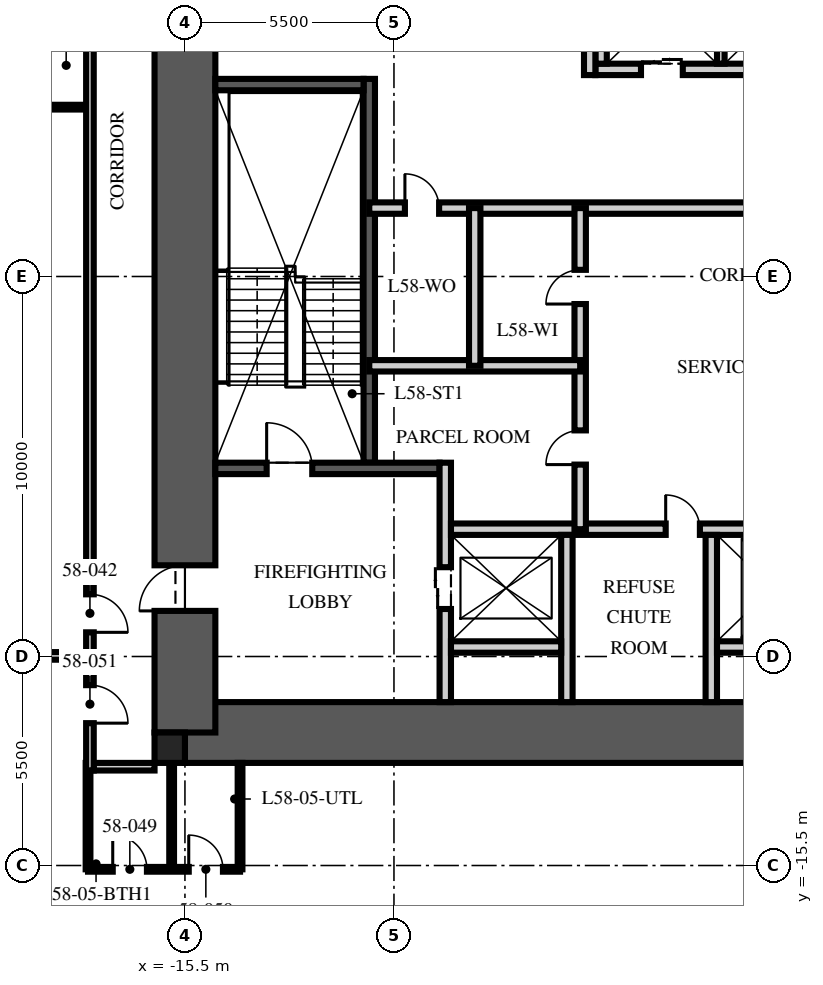
"""IFC4 building model, lengths in metres.
Left out: names, types, materials, properties, quantities, classifications, styles, units other than length and angle.
Written with IfcOpenShell. Run it as: python <this file> out.ifc"""

import sys

from ifc_helpers import new_model, si_unit, direction, frame, frame_2d, origin, origin_2d, place, context, subcontext, project, spatial, rectangle, extrude, element, fill, save


model = new_model("IFC4")
c1 = context("Model", 3, precision=1e-05, world=origin(), true_north=direction((0.0, 1.0)))
c2 = subcontext(c1, "Body", "Model", "MODEL_VIEW")
j1 = project(units=[si_unit("LENGTHUNIT", "METRE"), si_unit("PLANEANGLEUNIT", "RADIAN")], contexts=[c1])
p1 = place(None, origin())
s1 = spatial("IfcSite", under=j1, at=p1, CompositionType="ELEMENT")
p2 = place(p1, origin())
s2 = spatial("IfcBuilding", under=s1, at=p2, CompositionType="ELEMENT")
p3 = place(p2, frame((0.0, 0.0, 233.25)))
s3 = spatial("IfcBuildingStorey", under=s2, at=p3, CompositionType="ELEMENT", Elevation=233.25)
p4 = place(p3, frame((-15.5, -12.0, -0.25), z_axis=(0.0, 0.0, 1.0), x_axis=(1.0, 0.0, 0.0)))
e1 = element("IfcWall", 1, at=p4, inside=s3, PredefinedType="SHEAR", context=c2, shape_type="SweptSolid", body=[
    extrude(rectangle(XDim=31.0, YDim=1.6, at=frame_2d((15.5, 0.0))), origin(), (0.0, 0.0, 1.0), 3.75),
])
p5 = place(p3, frame((-15.5, -12.0, -0.25), z_axis=(0.0, 0.0, 1.0), x_axis=(0.0, 1.0, 0.0)))
e2 = element("IfcWall", 2, at=p5, inside=s3, PredefinedType="SHEAR", context=c2, shape_type="SweptSolid", body=[
    extrude(rectangle(XDim=24.0, YDim=1.6, at=frame_2d((12.0, 0.0))), origin(), (0.0, 0.0, 1.0), 3.75),
])
p6 = place(p5, frame((3.2, 0.0, 0.25)))
e3 = element("IfcOpeningElement", 3, at=p6, cuts=e2, PredefinedType="OPENING", context=c2, shape_type="SweptSolid", body=[
    extrude(rectangle(XDim=1.2, YDim=2.1, at=frame_2d((0.6, 1.05))), frame((0.0, 0.81, 0.0), z_axis=(0.0, -1.0, 0.0), x_axis=(1.0, 0.0, 0.0)), (0.0, 0.0, 1.0), 1.62),
])
p7 = place(p5, frame((19.3, 0.0, 0.25)))
e4 = element("IfcOpeningElement", 4, at=p7, cuts=e2, PredefinedType="OPENING", context=c2, shape_type="SweptSolid", body=[
    extrude(rectangle(XDim=1.8, YDim=2.1, at=frame_2d((0.9, 1.05))), frame((0.0, 0.81, 0.0), z_axis=(0.0, -1.0, 0.0), x_axis=(1.0, 0.0, 0.0)), (0.0, 0.0, 1.0), 1.62),
])
p8 = place(p3, frame((-15.9, -12.4, -0.25), z_axis=(0.0, 0.0, 1.0), x_axis=(1.0, 0.0, 0.0)))
e5 = element("IfcColumn", 5, at=p8, inside=s3, PredefinedType="COLUMN", context=c2, shape_type="SweptSolid", body=[
    extrude(rectangle(XDim=0.8, YDim=0.8, at=origin_2d()), origin(), (0.0, 0.0, 1.0), 3.75),
])
p9 = place(p3, frame((-10.65, -4.9, 0.0), z_axis=(0.0, 0.0, 1.0), x_axis=(0.0, 1.0, 0.0)))
e6 = element("IfcWall", 6, at=p9, inside=s3, PredefinedType="SOLIDWALL", context=c2, shape_type="SweptSolid", body=[
    extrude(rectangle(XDim=10.1, YDim=0.3, at=frame_2d((5.05, 0.0))), origin(), (0.0, 0.0, 1.0), 3.5),
])
p10 = place(p3, frame((-14.7, -5.05, 0.0), z_axis=(0.0, 0.0, 1.0), x_axis=(1.0, 0.0, 0.0)))
e7 = element("IfcWall", 7, at=p10, inside=s3, PredefinedType="SOLIDWALL", context=c2, shape_type="SweptSolid", body=[
    extrude(rectangle(XDim=5.9, YDim=0.3, at=frame_2d((2.95, 0.0))), origin(), (0.0, 0.0, 1.0), 3.5),
])
p11 = place(p10, frame((1.35, 0.0, 0.0)))
e8 = element("IfcOpeningElement", 8, at=p11, cuts=e7, PredefinedType="OPENING", context=c2, shape_type="SweptSolid", body=[
    extrude(rectangle(XDim=1.2, YDim=2.1, at=frame_2d((0.6, 1.05))), frame((0.0, 0.16, 0.0), z_axis=(0.0, -1.0, 0.0), x_axis=(1.0, 0.0, 0.0)), (0.0, 0.0, 1.0), 0.32),
])
p12 = place(p3, frame((-14.7, 5.05, 0.0), z_axis=(0.0, 0.0, 1.0), x_axis=(1.0, 0.0, 0.0)))
e9 = element("IfcWall", 9, at=p12, inside=s3, PredefinedType="SOLIDWALL", context=c2, shape_type="SweptSolid", body=[
    extrude(rectangle(XDim=3.9, YDim=0.3, at=frame_2d((1.95, 0.0))), origin(), (0.0, 0.0, 1.0), 3.5),
])
p13 = place(p3, frame((-8.65, -11.2, 0.0), z_axis=(0.0, 0.0, 1.0), x_axis=(0.0, 1.0, 0.0)))
e10 = element("IfcWall", 10, at=p13, inside=s3, PredefinedType="PARTITIONING", context=c2, shape_type="SweptSolid", body=[
    extrude(rectangle(XDim=6.3, YDim=0.3, at=frame_2d((3.15, 0.0))), origin(), (0.0, 0.0, 1.0), 3.5),
])
p14 = place(p13, frame((2.45, 0.0, 0.0)))
e11 = element("IfcOpeningElement", 11, at=p14, cuts=e10, PredefinedType="OPENING", context=c2, shape_type="SweptSolid", body=[
    extrude(rectangle(XDim=1.1, YDim=2.1, at=frame_2d((0.55, 1.05))), frame((0.0, 0.16, 0.0), z_axis=(0.0, -1.0, 0.0), x_axis=(1.0, 0.0, 0.0)), (0.0, 0.0, 1.0), 0.32),
])
p15 = place(p3, frame((-8.5, -6.65, 0.0), z_axis=(0.0, 0.0, 1.0), x_axis=(1.0, 0.0, 0.0)))
e12 = element("IfcWall", 12, at=p15, inside=s3, PredefinedType="PARTITIONING", context=c2, shape_type="SweptSolid", body=[
    extrude(rectangle(XDim=17.0, YDim=0.3, at=frame_2d((8.5, 0.0))), origin(), (0.0, 0.0, 1.0), 3.5),
])
p16 = place(p15, frame((7.8, 0.0, 0.0)))
e13 = element("IfcOpeningElement", 13, at=p16, cuts=e12, PredefinedType="OPENING", context=c2, shape_type="SweptSolid", body=[
    extrude(rectangle(XDim=1.3, YDim=2.4, at=frame_2d((0.65, 1.2))), frame((0.0, 0.16, 0.0), z_axis=(0.0, -1.0, 0.0), x_axis=(1.0, 0.0, 0.0)), (0.0, 0.0, 1.0), 0.32),
])
p17 = place(p15, frame((5.65, 0.0, 0.0)))
e14 = element("IfcOpeningElement", 14, at=p17, cuts=e12, PredefinedType="OPENING", context=c2, shape_type="SweptSolid", body=[
    extrude(rectangle(XDim=0.9, YDim=2.1, at=frame_2d((0.45, 1.05))), frame((0.0, 0.16, 0.0), z_axis=(0.0, -1.0, 0.0), x_axis=(1.0, 0.0, 0.0)), (0.0, 0.0, 1.0), 0.32),
])
p18 = place(p15, frame((10.4, 0.0, 0.0)))
e15 = element("IfcOpeningElement", 15, at=p18, cuts=e12, PredefinedType="OPENING", context=c2, shape_type="SweptSolid", body=[
    extrude(rectangle(XDim=0.9, YDim=2.1, at=frame_2d((0.45, 1.05))), frame((0.0, 0.16, 0.0), z_axis=(0.0, -1.0, 0.0), x_axis=(1.0, 0.0, 0.0)), (0.0, 0.0, 1.0), 0.32),
])
for number, where, z_axis, x_axis in (
    (16, (-5.45, -11.2, 0.0), (0.0, 0.0, 1.0), (0.0, 1.0, 0.0)),
    (17, (-1.65, -11.2, 0.0), (0.0, 0.0, 1.0), (0.0, 1.0, 0.0)),
):
    element("IfcWall", number, at=place(p3, frame(where, z_axis=z_axis, x_axis=x_axis)), inside=s3, PredefinedType="PARTITIONING", context=c2, shape_type="SweptSolid", body=[
        extrude(rectangle(XDim=4.4, YDim=0.3, at=frame_2d((2.2, 0.0))), origin(), (0.0, 0.0, 1.0), 3.5),
    ])
for number, where, z_axis, x_axis in (
    (18, (-8.5, -9.75, 0.0), (0.0, 0.0, 1.0), (1.0, 0.0, 0.0)),
    (19, (-1.5, -9.75, 0.0), (0.0, 0.0, 1.0), (1.0, 0.0, 0.0)),
):
    element("IfcWall", number, at=place(p3, frame(where, z_axis=z_axis, x_axis=x_axis)), inside=s3, PredefinedType="PARTITIONING", context=c2, shape_type="SweptSolid", body=[
        extrude(rectangle(XDim=2.9, YDim=0.3, at=frame_2d((1.45, 0.0))), origin(), (0.0, 0.0, 1.0), 3.5),
    ])
p19 = place(p3, frame((-4.7, 5.45, 0.0), z_axis=(0.0, 0.0, 1.0), x_axis=(1.0, 0.0, 0.0)))
e20 = element("IfcWall", 20, at=p19, inside=s3, PredefinedType="PARTITIONING", context=c2, shape_type="SweptSolid", body=[
    extrude(rectangle(XDim=9.7, YDim=0.3, at=frame_2d((4.85, 0.0))), origin(), (0.0, 0.0, 1.0), 3.5),
])
p20 = place(p19, frame((1.2, 0.0, 0.0)))
e21 = element("IfcOpeningElement", 21, at=p20, cuts=e20, PredefinedType="OPENING", context=c2, shape_type="SweptSolid", body=[
    extrude(rectangle(XDim=1.1, YDim=2.1, at=frame_2d((0.55, 1.05))), frame((0.0, 0.16, 0.0), z_axis=(0.0, -1.0, 0.0), x_axis=(1.0, 0.0, 0.0)), (0.0, 0.0, 1.0), 0.32),
])
p21 = place(p19, frame((4.3, 0.0, 0.0)))
e22 = element("IfcOpeningElement", 22, at=p21, cuts=e20, PredefinedType="OPENING", context=c2, shape_type="SweptSolid", body=[
    extrude(rectangle(XDim=1.1, YDim=2.1, at=frame_2d((0.55, 1.05))), frame((0.0, 0.16, 0.0), z_axis=(0.0, -1.0, 0.0), x_axis=(1.0, 0.0, 0.0)), (0.0, 0.0, 1.0), 0.32),
])
p22 = place(p19, frame((7.4, 0.0, 0.0)))
e23 = element("IfcOpeningElement", 23, at=p22, cuts=e20, PredefinedType="OPENING", context=c2, shape_type="SweptSolid", body=[
    extrude(rectangle(XDim=1.1, YDim=2.1, at=frame_2d((0.55, 1.05))), frame((0.0, 0.16, 0.0), z_axis=(0.0, -1.0, 0.0), x_axis=(1.0, 0.0, 0.0)), (0.0, 0.0, 1.0), 0.32),
])
p23 = place(p3, frame((-4.55, 5.6, 0.0), z_axis=(0.0, 0.0, 1.0), x_axis=(0.0, 1.0, 0.0)))
e24 = element("IfcWall", 24, at=p23, inside=s3, PredefinedType="PARTITIONING", context=c2, shape_type="SweptSolid", body=[
    extrude(rectangle(XDim=2.8, YDim=0.3, at=frame_2d((1.4, 0.0))), origin(), (0.0, 0.0, 1.0), 3.5),
])
p24 = place(p3, frame((-1.4, 5.6, 0.0), z_axis=(0.0, 0.0, 1.0), x_axis=(0.0, 1.0, 0.0)))
e25 = element("IfcWall", 25, at=p24, inside=s3, PredefinedType="PARTITIONING", context=c2, shape_type="SweptSolid", body=[
    extrude(rectangle(XDim=2.8, YDim=0.2, at=frame_2d((1.4, 0.0))), origin(), (0.0, 0.0, 1.0), 3.5),
])
p25 = place(p3, frame((-10.65, 1.8, 0.0), z_axis=(0.0, 0.0, 1.0), x_axis=(1.0, 0.0, 0.0)))
e26 = element("IfcWall", 26, at=p25, inside=s3, PredefinedType="PARTITIONING", context=c2, shape_type="SweptSolid", body=[
    extrude(rectangle(XDim=21.3, YDim=0.3, at=frame_2d((10.65, 0.0))), origin(), (0.0, 0.0, 1.0), 3.5),
])
p26 = place(p25, frame((10.05, 0.0, 0.0)))
e27 = element("IfcOpeningElement", 27, at=p26, cuts=e26, PredefinedType="OPENING", context=c2, shape_type="SweptSolid", body=[
    extrude(rectangle(XDim=1.2, YDim=2.1, at=frame_2d((0.6, 1.05))), frame((0.0, 0.16, 0.0), z_axis=(0.0, -1.0, 0.0), x_axis=(1.0, 0.0, 0.0)), (0.0, 0.0, 1.0), 0.32),
])
p27 = place(p25, frame((0.938, 0.0, 0.0)))
e28 = element("IfcOpeningElement", 28, at=p27, cuts=e26, PredefinedType="OPENING", context=c2, shape_type="SweptSolid", body=[
    extrude(rectangle(XDim=0.9, YDim=2.1, at=frame_2d((0.45, 1.05))), frame((0.0, 0.16, 0.0), z_axis=(0.0, -1.0, 0.0), x_axis=(1.0, 0.0, 0.0)), (0.0, 0.0, 1.0), 0.32),
])
p28 = place(p3, frame((-5.1, -6.65, 0.0), z_axis=(0.0, 0.0, 1.0), x_axis=(0.0, 1.0, 0.0)))
e29 = element("IfcWall", 29, at=p28, inside=s3, PredefinedType="PARTITIONING", context=c2, shape_type="SweptSolid", body=[
    extrude(rectangle(XDim=8.45, YDim=0.3, at=frame_2d((4.225, 0.0))), origin(), (0.0, 0.0, 1.0), 3.5),
])
p29 = place(p28, frame((1.7, 0.0, 0.0)))
e30 = element("IfcOpeningElement", 30, at=p29, cuts=e29, PredefinedType="OPENING", context=c2, shape_type="SweptSolid", body=[
    extrude(rectangle(XDim=0.9, YDim=2.1, at=frame_2d((0.45, 1.05))), frame((0.0, 0.16, 0.0), z_axis=(0.0, -1.0, 0.0), x_axis=(1.0, 0.0, 0.0)), (0.0, 0.0, 1.0), 0.32),
])
p30 = place(p28, frame((5.925, 0.0, 0.0)))
e31 = element("IfcOpeningElement", 31, at=p30, cuts=e29, PredefinedType="OPENING", context=c2, shape_type="SweptSolid", body=[
    extrude(rectangle(XDim=0.9, YDim=2.1, at=frame_2d((0.45, 1.05))), frame((0.0, 0.16, 0.0), z_axis=(0.0, -1.0, 0.0), x_axis=(1.0, 0.0, 0.0)), (0.0, 0.0, 1.0), 0.32),
])
p31 = place(p3, frame((-10.65, -2.35, 0.0), z_axis=(0.0, 0.0, 1.0), x_axis=(1.0, 0.0, 0.0)))
e32 = element("IfcWall", 32, at=p31, inside=s3, PredefinedType="PARTITIONING", context=c2, shape_type="SweptSolid", body=[
    extrude(rectangle(XDim=5.55, YDim=0.3, at=frame_2d((2.775, 0.0))), origin(), (0.0, 0.0, 1.0), 3.5),
])
p32 = place(p3, frame((-7.875, -2.35, 0.0), z_axis=(0.0, 0.0, 1.0), x_axis=(0.0, 1.0, 0.0)))
e33 = element("IfcWall", 33, at=p32, inside=s3, PredefinedType="PARTITIONING", context=c2, shape_type="SweptSolid", body=[
    extrude(rectangle(XDim=4.15, YDim=0.3, at=frame_2d((2.075, 0.0))), origin(), (0.0, 0.0, 1.0), 3.5),
])
p33 = place(p3, frame((-4.85, 5.3, 0.0), z_axis=(0.0, 0.0, 1.0), x_axis=(0.0, 1.0, 0.0)))
e34 = element("IfcWall", 34, at=p33, inside=s3, PredefinedType="PARTITIONING", context=c2, shape_type="SweptSolid", body=[
    extrude(rectangle(XDim=5.9, YDim=0.3, at=frame_2d((2.95, 0.0))), origin(), (0.0, 0.0, 1.0), 3.5),
])
p34 = place(p33, frame((4.15, 0.0, 0.0)))
e35 = element("IfcOpeningElement", 35, at=p34, cuts=e34, PredefinedType="OPENING", context=c2, shape_type="SweptSolid", body=[
    extrude(rectangle(XDim=0.9, YDim=2.1, at=frame_2d((0.45, 1.05))), frame((0.0, 0.16, 0.0), z_axis=(0.0, -1.0, 0.0), x_axis=(1.0, 0.0, 0.0)), (0.0, 0.0, 1.0), 0.32),
])
p35 = place(p3, frame((-16.3, -12.9, 0.0), z_axis=(0.0, 0.0, 1.0), x_axis=(-1.0, 0.0, 0.0)))
e36 = element("IfcWall", 36, at=p35, inside=s3, PredefinedType="PARTITIONING", context=c2, shape_type="SweptSolid", body=[
    extrude(rectangle(XDim=1.6, YDim=0.2, at=frame_2d((0.8, 0.0))), origin(), (0.0, 0.0, 1.0), 2.3),
])
p36 = place(p3, frame((-18.1, -9.984, 0.0), z_axis=(0.0, 0.0, 1.0), x_axis=(-1.0, 0.0, 0.0)))
e37 = element("IfcWall", 37, at=p36, inside=s3, PredefinedType="PARTITIONING", context=c2, shape_type="SweptSolid", body=[
    extrude(rectangle(XDim=7.85, YDim=0.2, at=frame_2d((3.925, 0.0))), origin(), (0.0, 0.0, 1.0), 2.91),
])
p37 = place(p3, frame((-18.1, 4.456, 0.0), z_axis=(0.0, 0.0, 1.0), x_axis=(-1.0, 0.0, 0.0)))
e38 = element("IfcWall", 38, at=p37, inside=s3, PredefinedType="PARTITIONING", context=c2, shape_type="SweptSolid", body=[
    extrude(rectangle(XDim=1.95, YDim=0.125, at=frame_2d((0.975, 0.0))), origin(), (0.0, 0.0, 1.0), 3.5),
])
p38 = place(p3, frame((-18.05, -15.6, 0.0), z_axis=(0.0, 0.0, 1.0), x_axis=(1.0, 0.0, 0.0)))
e39 = element("IfcWall", 39, at=p38, inside=s3, PredefinedType="PARTITIONING", context=c2, shape_type="SweptSolid", body=[
    extrude(rectangle(XDim=4.0, YDim=0.125, at=frame_2d((2.0, 0.0))), origin(), (0.0, 0.0, 1.0), 2.3),
])
p39 = place(p38, frame((0.65, 0.0, 0.0)))
e40 = element("IfcOpeningElement", 40, at=p39, cuts=e39, PredefinedType="OPENING", context=c2, shape_type="SweptSolid", body=[
    extrude(rectangle(XDim=0.9, YDim=2.1, at=frame_2d((0.45, 1.05))), frame((0.0, 0.073, 0.0), z_axis=(0.0, -1.0, 0.0), x_axis=(1.0, 0.0, 0.0)), (0.0, 0.0, 1.0), 0.145),
])
p40 = place(p38, frame((2.65, 0.0, 0.0)))
e41 = element("IfcOpeningElement", 41, at=p40, cuts=e39, PredefinedType="OPENING", context=c2, shape_type="SweptSolid", body=[
    extrude(rectangle(XDim=0.9, YDim=2.1, at=frame_2d((0.45, 1.05))), frame((0.0, 0.073, 0.0), z_axis=(0.0, -1.0, 0.0), x_axis=(1.0, 0.0, 0.0)), (0.0, 0.0, 1.0), 0.145),
])
for number, where, z_axis, x_axis in (
    (42, (-18.05, -12.8, 0.0), (0.0, 0.0, 1.0), (0.0, -1.0, 0.0)),
    (43, (-15.85, -12.8, 0.0), (0.0, 0.0, 1.0), (0.0, -1.0, 0.0)),
):
    element("IfcWall", number, at=place(p3, frame(where, z_axis=z_axis, x_axis=x_axis)), inside=s3, PredefinedType="PARTITIONING", context=c2, shape_type="SweptSolid", body=[
        extrude(rectangle(XDim=2.8, YDim=0.125, at=frame_2d((1.4, 0.0))), origin(), (0.0, 0.0, 1.0), 2.3),
    ])
p41 = place(p3, frame((-14.05, -12.8, 0.0), z_axis=(0.0, 0.0, 1.0), x_axis=(0.0, -1.0, 0.0)))
e44 = element("IfcWall", 44, at=p41, inside=s3, PredefinedType="PARTITIONING", context=c2, shape_type="SweptSolid", body=[
    extrude(rectangle(XDim=2.8, YDim=0.125, at=frame_2d((1.4, 0.0))), origin(), (0.0, 0.0, 1.0), 3.5),
])
p42 = place(p3, frame((-18.0, 12.8, 0.0), z_axis=(0.0, 0.0, 1.0), x_axis=(0.0, -1.0, 0.0)))
e45 = element("IfcWall", 45, at=p42, inside=s3, PredefinedType="PARTITIONING", context=c2, shape_type="SweptSolid", body=[
    extrude(rectangle(XDim=25.8, YDim=0.2, at=frame_2d((12.9, 0.0))), origin(), (0.0, 0.0, 1.0), 2.6),
])
p43 = place(p42, frame((4.4, 0.0, 0.0)))
e46 = element("IfcOpeningElement", 46, at=p43, cuts=e45, PredefinedType="OPENING", context=c2, shape_type="SweptSolid", body=[
    extrude(rectangle(XDim=1.0, YDim=2.2, at=frame_2d((0.5, 1.1))), frame((0.0, 0.11, 0.0), z_axis=(0.0, -1.0, 0.0), x_axis=(1.0, 0.0, 0.0)), (0.0, 0.0, 1.0), 0.22),
])
p44 = place(p42, frame((21.164, 0.0, 0.0)))
e47 = element("IfcOpeningElement", 47, at=p44, cuts=e45, PredefinedType="OPENING", context=c2, shape_type="SweptSolid", body=[
    extrude(rectangle(XDim=1.0, YDim=2.2, at=frame_2d((0.5, 1.1))), frame((0.0, 0.11, 0.0), z_axis=(0.0, -1.0, 0.0), x_axis=(1.0, 0.0, 0.0)), (0.0, 0.0, 1.0), 0.22),
])
p45 = place(p42, frame((23.554, 0.0, 0.0)))
e48 = element("IfcOpeningElement", 48, at=p45, cuts=e45, PredefinedType="OPENING", context=c2, shape_type="SweptSolid", body=[
    extrude(rectangle(XDim=1.0, YDim=2.2, at=frame_2d((0.5, 1.1))), frame((0.0, 0.11, 0.0), z_axis=(0.0, -1.0, 0.0), x_axis=(1.0, 0.0, 0.0)), (0.0, 0.0, 1.0), 0.22),
])
p46 = place(p11, origin())
e49 = element("IfcDoor", 49, at=p46, inside=s3, OperationType="SINGLE_SWING_LEFT", PredefinedType="DOOR", context=c2, shape_type="SweptSolid", body=[
    extrude(rectangle(XDim=1.2, YDim=2.1, at=frame_2d((0.6, 1.05))), frame((0.0, 0.025, 0.0), z_axis=(0.0, -1.0, 0.0), x_axis=(1.0, 0.0, 0.0)), (0.0, 0.0, 1.0), 0.05),
])
fill(e8, e49)
p47 = place(p6, origin())
e50 = element("IfcDoor", 50, at=p47, inside=s3, OperationType="SINGLE_SWING_LEFT", PredefinedType="DOOR", context=c2, shape_type="SweptSolid", body=[
    extrude(rectangle(XDim=1.2, YDim=2.1, at=frame_2d((0.6, 1.05))), frame((0.0, 0.025, 0.0), z_axis=(0.0, -1.0, 0.0), x_axis=(1.0, 0.0, 0.0)), (0.0, 0.0, 1.0), 0.05),
])
fill(e3, e50)
p48 = place(p14, origin())
e51 = element("IfcDoor", 51, at=p48, inside=s3, OperationType="DOUBLE_DOOR_SLIDING", PredefinedType="DOOR", context=c2, shape_type="SweptSolid", body=[
    extrude(rectangle(XDim=1.1, YDim=2.1, at=frame_2d((0.55, 1.05))), frame((0.0, 0.025, 0.0), z_axis=(0.0, -1.0, 0.0), x_axis=(1.0, 0.0, 0.0)), (0.0, 0.0, 1.0), 0.05),
])
fill(e11, e51)
p49 = place(p20, origin())
e52 = element("IfcDoor", 52, at=p49, inside=s3, OperationType="DOUBLE_DOOR_SLIDING", PredefinedType="DOOR", context=c2, shape_type="SweptSolid", body=[
    extrude(rectangle(XDim=1.1, YDim=2.1, at=frame_2d((0.55, 1.05))), frame((0.0, 0.025, 0.0), z_axis=(0.0, -1.0, 0.0), x_axis=(1.0, 0.0, 0.0)), (0.0, 0.0, 1.0), 0.05),
])
fill(e21, e52)
p50 = place(p17, origin())
e53 = element("IfcDoor", 53, at=p50, inside=s3, OperationType="SINGLE_SWING_LEFT", PredefinedType="DOOR", context=c2, shape_type="SweptSolid", body=[
    extrude(rectangle(XDim=0.9, YDim=2.1, at=frame_2d((0.45, 1.05))), frame((0.0, 0.025, 0.0), z_axis=(0.0, -1.0, 0.0), x_axis=(1.0, 0.0, 0.0)), (0.0, 0.0, 1.0), 0.05),
])
fill(e14, e53)
p51 = place(p29, origin())
e54 = element("IfcDoor", 54, at=p51, inside=s3, OperationType="SINGLE_SWING_LEFT", PredefinedType="DOOR", context=c2, shape_type="SweptSolid", body=[
    extrude(rectangle(XDim=0.9, YDim=2.1, at=frame_2d((0.45, 1.05))), frame((0.0, 0.025, 0.0), z_axis=(0.0, -1.0, 0.0), x_axis=(1.0, 0.0, 0.0)), (0.0, 0.0, 1.0), 0.05),
])
fill(e30, e54)
p52 = place(p30, origin())
e55 = element("IfcDoor", 55, at=p52, inside=s3, OperationType="SINGLE_SWING_LEFT", PredefinedType="DOOR", context=c2, shape_type="SweptSolid", body=[
    extrude(rectangle(XDim=0.9, YDim=2.1, at=frame_2d((0.45, 1.05))), frame((0.0, 0.025, 0.0), z_axis=(0.0, -1.0, 0.0), x_axis=(1.0, 0.0, 0.0)), (0.0, 0.0, 1.0), 0.05),
])
fill(e31, e55)
p53 = place(p27, origin())
e56 = element("IfcDoor", 56, at=p53, inside=s3, OperationType="SINGLE_SWING_LEFT", PredefinedType="DOOR", context=c2, shape_type="SweptSolid", body=[
    extrude(rectangle(XDim=0.9, YDim=2.1, at=frame_2d((0.45, 1.05))), frame((0.0, 0.025, 0.0), z_axis=(0.0, -1.0, 0.0), x_axis=(1.0, 0.0, 0.0)), (0.0, 0.0, 1.0), 0.05),
])
fill(e28, e56)
p54 = place(p44, origin())
e57 = element("IfcDoor", 57, at=p54, inside=s3, OperationType="SINGLE_SWING_RIGHT", PredefinedType="DOOR", context=c2, shape_type="SweptSolid", body=[
    extrude(rectangle(XDim=1.0, YDim=2.2, at=frame_2d((0.5, 1.1))), frame((0.0, 0.025, 0.0), z_axis=(0.0, -1.0, 0.0), x_axis=(1.0, 0.0, 0.0)), (0.0, 0.0, 1.0), 0.05),
])
fill(e47, e57)
p55 = place(p39, origin())
e58 = element("IfcDoor", 58, at=p55, inside=s3, OperationType="SINGLE_SWING_LEFT", PredefinedType="DOOR", context=c2, shape_type="SweptSolid", body=[
    extrude(rectangle(XDim=0.9, YDim=2.1, at=frame_2d((0.45, 1.05))), frame((0.0, 0.025, 0.0), z_axis=(0.0, -1.0, 0.0), x_axis=(1.0, 0.0, 0.0)), (0.0, 0.0, 1.0), 0.05),
])
fill(e40, e58)
p56 = place(p40, origin())
e59 = element("IfcDoor", 59, at=p56, inside=s3, OperationType="SINGLE_SWING_LEFT", PredefinedType="DOOR", context=c2, shape_type="SweptSolid", body=[
    extrude(rectangle(XDim=0.9, YDim=2.1, at=frame_2d((0.45, 1.05))), frame((0.0, 0.025, 0.0), z_axis=(0.0, -1.0, 0.0), x_axis=(1.0, 0.0, 0.0)), (0.0, 0.0, 1.0), 0.05),
])
fill(e41, e59)
p57 = place(p45, origin())
e60 = element("IfcDoor", 60, at=p57, inside=s3, OperationType="SINGLE_SWING_RIGHT", PredefinedType="DOOR", context=c2, shape_type="SweptSolid", body=[
    extrude(rectangle(XDim=1.0, YDim=2.2, at=frame_2d((0.5, 1.1))), frame((0.0, 0.025, 0.0), z_axis=(0.0, -1.0, 0.0), x_axis=(1.0, 0.0, 0.0)), (0.0, 0.0, 1.0), 0.05),
])
fill(e48, e60)
save(model, sys.argv[1])
